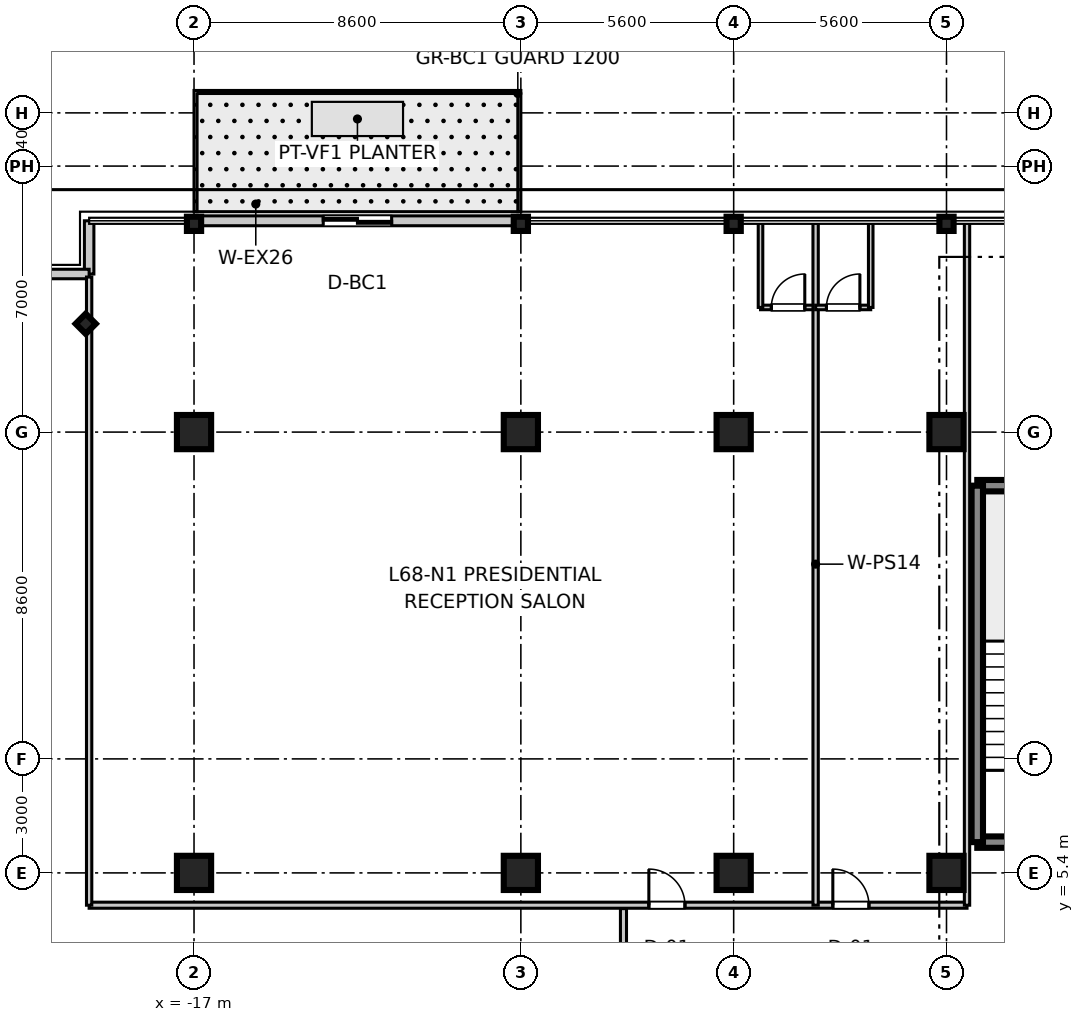
"""IFC4 building model, lengths in metres.
Left out: names, types, materials, properties, quantities, classifications, styles, units other than length and angle.
Written with IfcOpenShell. Run it as: python <this file> out.ifc"""

import sys

from ifc_helpers import new_model, si_unit, direction, frame, frame_2d, origin, origin_2d, place, context, subcontext, project, spatial, rectangle, i_section, extrude, source, transform, mapped, element, fill, save


model = new_model("IFC4")
c1 = context("Model", 3, precision=1e-05, world=origin(), true_north=direction((0.0, 1.0)))
c2 = subcontext(c1, "Body", "Model", "MODEL_VIEW")
j1 = project(units=[si_unit("LENGTHUNIT", "METRE"), si_unit("PLANEANGLEUNIT", "RADIAN")], contexts=[c1])
p1 = place(None, origin())
s1 = spatial("IfcSite", under=j1, at=p1, CompositionType="ELEMENT")
p2 = place(p1, origin())
s2 = spatial("IfcBuilding", under=s1, at=p2, CompositionType="ELEMENT")
p3 = place(p2, frame((0.0, 0.0, 266.3)))
s3 = spatial("IfcBuildingStorey", under=s2, at=p3, CompositionType="ELEMENT", Elevation=266.3)
m1 = source(origin(), c2, "Body", "SweptSolid", [
    extrude(rectangle(XDim=0.9, YDim=0.9, at=origin_2d()), origin(), (0.0, 0.0, 1.0), 3.705),
])
for number, where, z_axis, x_axis in (
    (1, (-17.0, 5.4, 0.0), (0.0, 0.0, 1.0), (1.0, 0.0, 0.0)),
    (2, (-17.0, 17.0, 0.0), (0.0, 0.0, 1.0), (1.0, 0.0, 0.0)),
    (3, (-8.4, 5.4, 0.0), (0.0, 0.0, 1.0), (1.0, 0.0, 0.0)),
    (4, (-8.4, 17.0, 0.0), (0.0, 0.0, 1.0), (1.0, 0.0, 0.0)),
    (5, (-2.8, 5.4, 0.0), (0.0, 0.0, 1.0), (1.0, 0.0, 0.0)),
    (6, (-2.8, 17.0, 0.0), (0.0, 0.0, 1.0), (1.0, 0.0, 0.0)),
    (7, (2.8, 5.4, 0.0), (0.0, 0.0, 1.0), (1.0, 0.0, 0.0)),
    (8, (2.8, 17.0, 0.0), (0.0, 0.0, 1.0), (1.0, 0.0, 0.0)),
):
    element("IfcColumn", number, at=place(p3, frame(where, z_axis=z_axis, x_axis=x_axis)), inside=s3, PredefinedType="COLUMN", context=c2, shape_type="MappedRepresentation", body=[
        mapped(m1, transform((0.0, 0.0, 0.0), scale=1.0)),
    ])
m2 = source(origin(), c2, "Body", "SweptSolid", [
    extrude(i_section(OverallWidth=0.374, OverallDepth=0.374, WebThickness=0.014, FlangeThickness=0.023, at=origin_2d()), origin(), (0.0, 0.0, 1.0), 3.705),
])
for number, where, z_axis, x_axis in (
    (9, (-17.0, 22.48, 0.0), (0.0, 0.0, 1.0), (0.0, 1.0, 0.0)),
    (10, (-8.4, 22.48, 0.0), (0.0, 0.0, 1.0), (0.0, 1.0, 0.0)),
    (11, (-2.8, 22.48, 0.0), (0.0, 0.0, 1.0), (0.0, 1.0, 0.0)),
    (12, (2.8, 22.48, 0.0), (0.0, 0.0, 1.0), (0.0, 1.0, 0.0)),
    (13, (-19.85, 19.85, 0.0), (0.0, 0.0, 1.0), (0.707, 0.707, 0.0)),
):
    element("IfcColumn", number, at=place(p3, frame(where, z_axis=z_axis, x_axis=x_axis)), inside=s3, PredefinedType="COLUMN", context=c2, shape_type="MappedRepresentation", body=[
        mapped(m2, transform((0.0, 0.0, 0.0), scale=1.0)),
    ])
m3 = source(origin(), c2, "Body", "SweptSolid", [
    extrude(rectangle(XDim=3.98, YDim=0.3, at=frame_2d((1.99, 0.0))), origin(), (0.0, 0.0, 1.0), 3.45),
])
for number, where, z_axis, x_axis in (
    (14, (3.61, 6.21, 0.0), (0.0, 0.0, 1.0), (1.0, 0.0, 0.0)),
    (15, (3.61, 15.59, 0.0), (0.0, 0.0, 1.0), (1.0, 0.0, 0.0)),
):
    element("IfcWall", number, at=place(p3, frame(where, z_axis=z_axis, x_axis=x_axis)), inside=s3, PredefinedType="SHEAR", context=c2, shape_type="MappedRepresentation", body=[
        mapped(m3, transform((0.0, 0.0, 0.0), scale=1.0)),
    ])
m4 = source(origin(), c2, "Body", "SweptSolid", [
    extrude(rectangle(XDim=9.38, YDim=0.3, at=frame_2d((4.69, 0.0))), origin(), (0.0, 0.0, 1.0), 3.45),
])
p4 = place(p3, frame((3.61, 6.21, 0.0), z_axis=(0.0, 0.0, 1.0), x_axis=(0.0, 1.0, 0.0)))
e16 = element("IfcWall", 16, at=p4, inside=s3, PredefinedType="SHEAR", context=c2, shape_type="MappedRepresentation", body=[
    mapped(m4, transform((0.0, 0.0, 0.0), scale=1.0)),
])
m5 = source(origin(), c2, "Body", "SweptSolid", [
    extrude(rectangle(XDim=1.4, YDim=0.25, at=frame_2d((0.7, 0.0))), origin(), (0.0, 0.0, 1.0), 3.45),
])
p5 = place(p3, frame((-19.76, 21.16, 0.0), z_axis=(0.0, 0.0, 1.0), x_axis=(0.0, 1.0, 0.0)))
e17 = element("IfcWall", 17, at=p5, inside=s3, PredefinedType="STANDARD", context=c2, shape_type="MappedRepresentation", body=[
    mapped(m5, transform((0.0, 0.0, 0.0), scale=1.0)),
])
m6 = source(origin(), c2, "Body", "SweptSolid", [
    extrude(rectangle(XDim=1.4, YDim=0.25, at=frame_2d((0.7, 0.0))), origin(), (0.0, 0.0, 1.0), 3.45),
])
p6 = place(p3, frame((-21.16, 21.16, 0.0), z_axis=(0.0, 0.0, 1.0), x_axis=(1.0, 0.0, 0.0)))
e18 = element("IfcWall", 18, at=p6, inside=s3, PredefinedType="STANDARD", context=c2, shape_type="MappedRepresentation", body=[
    mapped(m6, transform((0.0, 0.0, 0.0), scale=1.0)),
])
m7 = source(origin(), c2, "Body", "SweptSolid", [
    extrude(rectangle(XDim=8.6, YDim=0.26, at=frame_2d((4.3, 0.0))), origin(), (0.0, 0.0, 1.0), 2.93),
])
p7 = place(p3, frame((-17.0, 22.56, 0.0), z_axis=(0.0, 0.0, 1.0), x_axis=(1.0, 0.0, 0.0)))
e19 = element("IfcWall", 19, at=p7, inside=s3, PredefinedType="STANDARD", context=c2, shape_type="MappedRepresentation", body=[
    mapped(m7, transform((0.0, 0.0, 0.0), scale=1.0)),
])
p8 = place(p7, frame((3.4, 0.0, 0.0)))
e20 = element("IfcOpeningElement", 20, at=p8, cuts=e19, PredefinedType="OPENING", context=c2, shape_type="SweptSolid", body=[
    extrude(rectangle(XDim=1.8, YDim=2.25, at=frame_2d((0.9, 1.125))), frame((0.0, 0.14, 0.0), z_axis=(0.0, -1.0, 0.0), x_axis=(1.0, 0.0, 0.0)), (0.0, 0.0, 1.0), 0.28),
])
m8 = source(origin(), c2, "Body", "SweptSolid", [
    extrude(rectangle(XDim=23.1, YDim=0.16, at=frame_2d((11.55, 0.0))), origin(), (0.0, 0.0, 1.0), 2.79),
])
p9 = place(p3, frame((-19.76, 4.55, 0.0), z_axis=(0.0, 0.0, 1.0), x_axis=(1.0, 0.0, 0.0)))
e21 = element("IfcWall", 21, at=p9, inside=s3, PredefinedType="PARTITIONING", context=c2, shape_type="MappedRepresentation", body=[
    mapped(m8, transform((0.0, 0.0, 0.0), scale=1.0)),
])
p10 = place(p9, frame((14.728, 0.0, 0.0)))
e22 = element("IfcOpeningElement", 22, at=p10, cuts=e21, PredefinedType="OPENING", context=c2, shape_type="SweptSolid", body=[
    extrude(rectangle(XDim=0.95, YDim=2.1, at=frame_2d((0.475, 1.05))), frame((0.0, 0.09, 0.0), z_axis=(0.0, -1.0, 0.0), x_axis=(1.0, 0.0, 0.0)), (0.0, 0.0, 1.0), 0.18),
])
p11 = place(p9, frame((19.569, 0.0, 0.0)))
e23 = element("IfcOpeningElement", 23, at=p11, cuts=e21, PredefinedType="OPENING", context=c2, shape_type="SweptSolid", body=[
    extrude(rectangle(XDim=0.95, YDim=2.1, at=frame_2d((0.475, 1.05))), frame((0.0, 0.09, 0.0), z_axis=(0.0, -1.0, 0.0), x_axis=(1.0, 0.0, 0.0)), (0.0, 0.0, 1.0), 0.18),
])
m9 = source(origin(), c2, "Body", "SweptSolid", [
    extrude(rectangle(XDim=16.53, YDim=0.14, at=frame_2d((8.265, 0.0))), origin(), (0.0, 0.0, 1.0), 2.79),
])
p12 = place(p3, frame((-19.76, 4.55, 0.0), z_axis=(0.0, 0.0, 1.0), x_axis=(0.0, 1.0, 0.0)))
e24 = element("IfcWall", 24, at=p12, inside=s3, PredefinedType="PARTITIONING", context=c2, shape_type="MappedRepresentation", body=[
    mapped(m9, transform((0.0, 0.0, 0.0), scale=1.0)),
])
m10 = source(origin(), c2, "Body", "SweptSolid", [
    extrude(rectangle(XDim=17.95, YDim=0.14, at=frame_2d((8.975, 0.0))), origin(), (0.0, 0.0, 1.0), 2.79),
])
p13 = place(p3, frame((3.34, 4.55, 0.0), z_axis=(0.0, 0.0, 1.0), x_axis=(0.0, 1.0, 0.0)))
e25 = element("IfcWall", 25, at=p13, inside=s3, PredefinedType="PARTITIONING", context=c2, shape_type="MappedRepresentation", body=[
    mapped(m10, transform((0.0, 0.0, 0.0), scale=1.0)),
])
m11 = source(origin(), c2, "Body", "SweptSolid", [
    extrude(rectangle(XDim=1.45, YDim=0.12, at=frame_2d((0.725, 0.0))), origin(), (0.0, 0.0, 1.0), 2.79),
])
p14 = place(p3, frame((-2.094, 20.28, 0.0), z_axis=(0.0, 0.0, 1.0), x_axis=(1.0, 0.0, 0.0)))
e26 = element("IfcWall", 26, at=p14, inside=s3, PredefinedType="PARTITIONING", context=c2, shape_type="MappedRepresentation", body=[
    mapped(m11, transform((0.0, 0.0, 0.0), scale=1.0)),
])
p15 = place(p14, frame((0.285, 0.0, 0.0)))
e27 = element("IfcOpeningElement", 27, at=p15, cuts=e26, PredefinedType="OPENING", context=c2, shape_type="SweptSolid", body=[
    extrude(rectangle(XDim=0.88, YDim=2.1, at=frame_2d((0.44, 1.05))), frame((0.0, 0.07, 0.0), z_axis=(0.0, -1.0, 0.0), x_axis=(1.0, 0.0, 0.0)), (0.0, 0.0, 1.0), 0.14),
])
m12 = source(origin(), c2, "Body", "SweptSolid", [
    extrude(rectangle(XDim=2.22, YDim=0.12, at=frame_2d((1.11, 0.0))), origin(), (0.0, 0.0, 1.0), 2.79),
])
p16 = place(p3, frame((-2.094, 20.28, 0.0), z_axis=(0.0, 0.0, 1.0), x_axis=(0.0, 1.0, 0.0)))
e28 = element("IfcWall", 28, at=p16, inside=s3, PredefinedType="PARTITIONING", context=c2, shape_type="MappedRepresentation", body=[
    mapped(m12, transform((0.0, 0.0, 0.0), scale=1.0)),
])
p17 = place(p3, frame((-0.644, 4.55, 0.0), z_axis=(0.0, 0.0, 1.0), x_axis=(0.0, 1.0, 0.0)))
e29 = element("IfcWall", 29, at=p17, inside=s3, PredefinedType="PARTITIONING", context=c2, shape_type="MappedRepresentation", body=[
    mapped(m10, transform((0.0, 0.0, 0.0), scale=1.0)),
])
p18 = place(p3, frame((-0.644, 20.28, 0.0), z_axis=(0.0, 0.0, 1.0), x_axis=(1.0, 0.0, 0.0)))
e30 = element("IfcWall", 30, at=p18, inside=s3, PredefinedType="PARTITIONING", context=c2, shape_type="MappedRepresentation", body=[
    mapped(m11, transform((0.0, 0.0, 0.0), scale=1.0)),
])
p19 = place(p18, frame((0.285, 0.0, 0.0)))
e31 = element("IfcOpeningElement", 31, at=p19, cuts=e30, PredefinedType="OPENING", context=c2, shape_type="SweptSolid", body=[
    extrude(rectangle(XDim=0.88, YDim=2.1, at=frame_2d((0.44, 1.05))), frame((0.0, 0.07, 0.0), z_axis=(0.0, -1.0, 0.0), x_axis=(1.0, 0.0, 0.0)), (0.0, 0.0, 1.0), 0.14),
])
p20 = place(p3, frame((0.806, 20.28, 0.0), z_axis=(0.0, 0.0, 1.0), x_axis=(0.0, 1.0, 0.0)))
e32 = element("IfcWall", 32, at=p20, inside=s3, PredefinedType="PARTITIONING", context=c2, shape_type="MappedRepresentation", body=[
    mapped(m12, transform((0.0, 0.0, 0.0), scale=1.0)),
])
m13 = source(origin(), c2, "Body", "SweptSolid", [
    extrude(rectangle(XDim=6.88, YDim=0.16, at=frame_2d((3.44, 0.0))), origin(), (0.0, 0.0, 1.0), 2.79),
])
p21 = place(p3, frame((-5.7, -2.42, 0.0), z_axis=(0.0, 0.0, 1.0), x_axis=(0.0, 1.0, 0.0)))
e33 = element("IfcWall", 33, at=p21, inside=s3, PredefinedType="PARTITIONING", context=c2, shape_type="MappedRepresentation", body=[
    mapped(m13, transform((0.0, 0.0, 0.0), scale=1.0)),
])
m14 = source(origin(), c2, "Body", "SweptSolid", [
    extrude(rectangle(XDim=0.88, YDim=2.1, at=frame_2d((0.44, 1.05))), frame((0.0, 0.025, 0.0), z_axis=(0.0, -1.0, 0.0), x_axis=(1.0, 0.0, 0.0)), (0.0, 0.0, 1.0), 0.05),
])
p22 = place(p15, origin())
e34 = element("IfcDoor", 34, at=p22, inside=s3, OperationType="SINGLE_SWING_RIGHT", PredefinedType="DOOR", context=c2, shape_type="MappedRepresentation", body=[
    mapped(m14, transform((0.0, 0.0, 0.0), scale=1.0)),
])
fill(e27, e34)
m15 = source(origin(), c2, "Body", "SweptSolid", [
    extrude(rectangle(XDim=0.95, YDim=2.1, at=frame_2d((0.475, 1.05))), frame((0.0, 0.025, 0.0), z_axis=(0.0, -1.0, 0.0), x_axis=(1.0, 0.0, 0.0)), (0.0, 0.0, 1.0), 0.05),
])
p23 = place(p10, origin())
e35 = element("IfcDoor", 35, at=p23, inside=s3, OperationType="SINGLE_SWING_LEFT", PredefinedType="DOOR", context=c2, shape_type="MappedRepresentation", body=[
    mapped(m15, transform((0.0, 0.0, 0.0), scale=1.0)),
])
fill(e22, e35)
p24 = place(p19, origin())
e36 = element("IfcDoor", 36, at=p24, inside=s3, OperationType="SINGLE_SWING_RIGHT", PredefinedType="DOOR", context=c2, shape_type="MappedRepresentation", body=[
    mapped(m14, transform((0.0, 0.0, 0.0), scale=1.0)),
])
fill(e31, e36)
p25 = place(p11, origin())
e37 = element("IfcDoor", 37, at=p25, inside=s3, OperationType="SINGLE_SWING_LEFT", PredefinedType="DOOR", context=c2, shape_type="MappedRepresentation", body=[
    mapped(m15, transform((0.0, 0.0, 0.0), scale=1.0)),
])
fill(e23, e37)
m16 = source(origin(), c2, "Body", "SweptSolid", [
    extrude(rectangle(XDim=1.8, YDim=2.25, at=frame_2d((0.9, 1.125))), frame((0.0, 0.025, 0.0), z_axis=(0.0, -1.0, 0.0), x_axis=(1.0, 0.0, 0.0)), (0.0, 0.0, 1.0), 0.05),
])
p26 = place(p8, origin())
e38 = element("IfcDoor", 38, at=p26, inside=s3, OperationType="DOUBLE_DOOR_SLIDING", PredefinedType="DOOR", context=c2, shape_type="MappedRepresentation", body=[
    mapped(m16, transform((0.0, 0.0, 0.0), scale=1.0)),
])
fill(e20, e38)
save(model, sys.argv[1])
